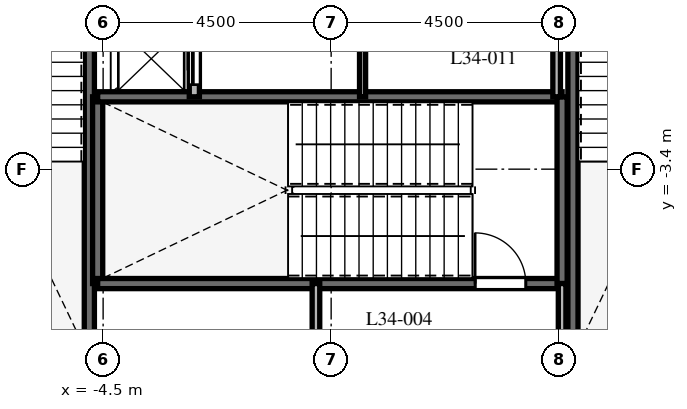
"""IFC4 building model, lengths in metres.
Left out: names, types, materials, properties, quantities, classifications, styles, units other than length and angle.
Written with IfcOpenShell. Run it as: python <this file> out.ifc"""

import sys

from ifc_helpers import new_model, si_unit, direction, frame, frame_2d, origin, place, context, subcontext, project, spatial, rectangle, extrude, element, fill, save


model = new_model("IFC4")
c1 = context("Model", 3, precision=1e-05, world=origin(), true_north=direction((0.0, 1.0)))
c2 = subcontext(c1, "Body", "Model", "MODEL_VIEW")
j1 = project(units=[si_unit("LENGTHUNIT", "METRE"), si_unit("PLANEANGLEUNIT", "RADIAN")], contexts=[c1])
p1 = place(None, origin())
s1 = spatial("IfcSite", under=j1, at=p1, CompositionType="ELEMENT")
p2 = place(p1, origin())
s2 = spatial("IfcBuilding", under=s1, at=p2, CompositionType="ELEMENT")
p3 = place(p2, frame((0.0, 0.0, 139.5)))
s3 = spatial("IfcBuildingStorey", under=s2, at=p3, CompositionType="ELEMENT", Elevation=139.5)
for number, where, z_axis, x_axis in (
    (1, (-4.772, -6.985, 0.0), (0.0, 0.0, 1.0), (0.0, 1.0, 0.0)),
    (2, (4.772, -6.985, 0.0), (0.0, 0.0, 1.0), (0.0, 1.0, 0.0)),
):
    element("IfcWall", number, at=place(p3, frame(where, z_axis=z_axis, x_axis=x_axis)), inside=s3, PredefinedType="SHEAR", context=c2, shape_type="SweptSolid", body=[
        extrude(rectangle(XDim=9.143, YDim=0.2, at=frame_2d((4.572, 0.0))), origin(), (0.0, 0.0, 1.0), 4.8),
    ])
p4 = place(p3, frame((-4.608, -5.658, 0.0), z_axis=(0.0, 0.0, 1.0), x_axis=(0.0, 1.0, 0.0)))
e3 = element("IfcWall", 3, at=p4, inside=s3, PredefinedType="SHEAR", context=c2, shape_type="SweptSolid", body=[
    extrude(rectangle(XDim=3.686, YDim=0.2, at=frame_2d((1.843, 0.0))), origin(), (0.0, 0.0, 1.0), 4.8),
])
p5 = place(p3, frame((-4.608, -5.658, 0.0), z_axis=(0.0, 0.0, 1.0), x_axis=(1.0, 0.0, 0.0)))
e4 = element("IfcWall", 4, at=p5, inside=s3, PredefinedType="SHEAR", context=c2, shape_type="SweptSolid", body=[
    extrude(rectangle(XDim=9.166, YDim=0.2, at=frame_2d((4.583, 0.0))), origin(), (0.0, 0.0, 1.0), 4.8),
])
p6 = place(p5, frame((7.45, 0.0, 0.0)))
e5 = element("IfcOpeningElement", 5, at=p6, cuts=e4, PredefinedType="OPENING", context=c2, shape_type="SweptSolid", body=[
    extrude(rectangle(XDim=1.0, YDim=2.15, at=frame_2d((0.5, 1.075))), frame((0.0, 0.11, 0.0), z_axis=(0.0, -1.0, 0.0), x_axis=(1.0, 0.0, 0.0)), (0.0, 0.0, 1.0), 0.22),
])
p7 = place(p3, frame((-4.608, -1.972, 0.0), z_axis=(0.0, 0.0, 1.0), x_axis=(1.0, 0.0, 0.0)))
e6 = element("IfcWall", 6, at=p7, inside=s3, PredefinedType="SHEAR", context=c2, shape_type="SweptSolid", body=[
    extrude(rectangle(XDim=9.166, YDim=0.2, at=frame_2d((4.583, 0.0))), origin(), (0.0, 0.0, 1.0), 4.8),
])
p8 = place(p3, frame((4.558, -5.658, 0.0), z_axis=(0.0, 0.0, 1.0), x_axis=(0.0, 1.0, 0.0)))
e7 = element("IfcWall", 7, at=p8, inside=s3, PredefinedType="SHEAR", context=c2, shape_type="SweptSolid", body=[
    extrude(rectangle(XDim=3.686, YDim=0.2, at=frame_2d((1.843, 0.0))), origin(), (0.0, 0.0, 1.0), 4.8),
])
for number, where, z_axis, x_axis in (
    (8, (-0.3, -7.02, 0.0), (0.0, 0.0, 1.0), (0.0, 1.0, 0.0)),
    (9, (4.558, -7.02, 0.0), (0.0, 0.0, 1.0), (0.0, 1.0, 0.0)),
):
    element("IfcWall", number, at=place(p3, frame(where, z_axis=z_axis, x_axis=x_axis)), inside=s3, PredefinedType="PARTITIONING", context=c2, shape_type="SweptSolid", body=[
        extrude(rectangle(XDim=1.362, YDim=0.15, at=frame_2d((0.681, 0.0))), origin(), (0.0, 0.0, 1.0), 4.5),
    ])
p9 = place(p3, frame((-2.7, -1.972, 0.0), z_axis=(0.0, 0.0, 1.0), x_axis=(0.0, 1.0, 0.0)))
e10 = element("IfcWall", 10, at=p9, inside=s3, PredefinedType="PARTITIONING", context=c2, shape_type="SweptSolid", body=[
    extrude(rectangle(XDim=1.472, YDim=0.2, at=frame_2d((0.736, 0.0))), origin(), (0.0, 0.0, 1.0), 4.5),
])
p10 = place(p9, frame((0.24, 0.0, 0.0)))
e11 = element("IfcOpeningElement", 11, at=p10, cuts=e10, PredefinedType="OPENING", context=c2, shape_type="SweptSolid", body=[
    extrude(rectangle(XDim=1.0, YDim=2.2, at=frame_2d((0.5, 1.1))), frame((0.0, 0.11, 0.0), z_axis=(0.0, -1.0, 0.0), x_axis=(1.0, 0.0, 0.0)), (0.0, 0.0, 1.0), 0.22),
])
p11 = place(p3, frame((4.45, -1.972, 0.0), z_axis=(0.0, 0.0, 1.0), x_axis=(0.0, 1.0, 0.0)))
e12 = element("IfcWall", 12, at=p11, inside=s3, PredefinedType="PARTITIONING", context=c2, shape_type="SweptSolid", body=[
    extrude(rectangle(XDim=4.222, YDim=0.15, at=frame_2d((2.111, 0.0))), origin(), (0.0, 0.0, 1.0), 4.5),
])
p12 = place(p3, frame((0.62, -1.972, 0.0), z_axis=(0.0, 0.0, 1.0), x_axis=(0.0, 1.0, 0.0)))
e13 = element("IfcWall", 13, at=p12, inside=s3, PredefinedType="PARTITIONING", context=c2, shape_type="SweptSolid", body=[
    extrude(rectangle(XDim=1.472, YDim=0.12, at=frame_2d((0.736, 0.0))), origin(), (0.0, 0.0, 1.0), 4.5),
])
p13 = place(p6, origin())
e14 = element("IfcDoor", 14, at=p13, inside=s3, OperationType="SINGLE_SWING_LEFT", PredefinedType="DOOR", context=c2, shape_type="SweptSolid", body=[
    extrude(rectangle(XDim=1.0, YDim=2.15, at=frame_2d((0.5, 1.075))), frame((0.0, 0.025, 0.0), z_axis=(0.0, -1.0, 0.0), x_axis=(1.0, 0.0, 0.0)), (0.0, 0.0, 1.0), 0.05),
])
fill(e5, e14)
p14 = place(p10, origin())
e15 = element("IfcDoor", 15, at=p14, inside=s3, OperationType="SLIDING_TO_LEFT", PredefinedType="DOOR", context=c2, shape_type="SweptSolid", body=[
    extrude(rectangle(XDim=1.0, YDim=2.2, at=frame_2d((0.5, 1.1))), frame((0.0, 0.025, 0.0), z_axis=(0.0, -1.0, 0.0), x_axis=(1.0, 0.0, 0.0)), (0.0, 0.0, 1.0), 0.05),
])
fill(e11, e15)
save(model, sys.argv[1])
